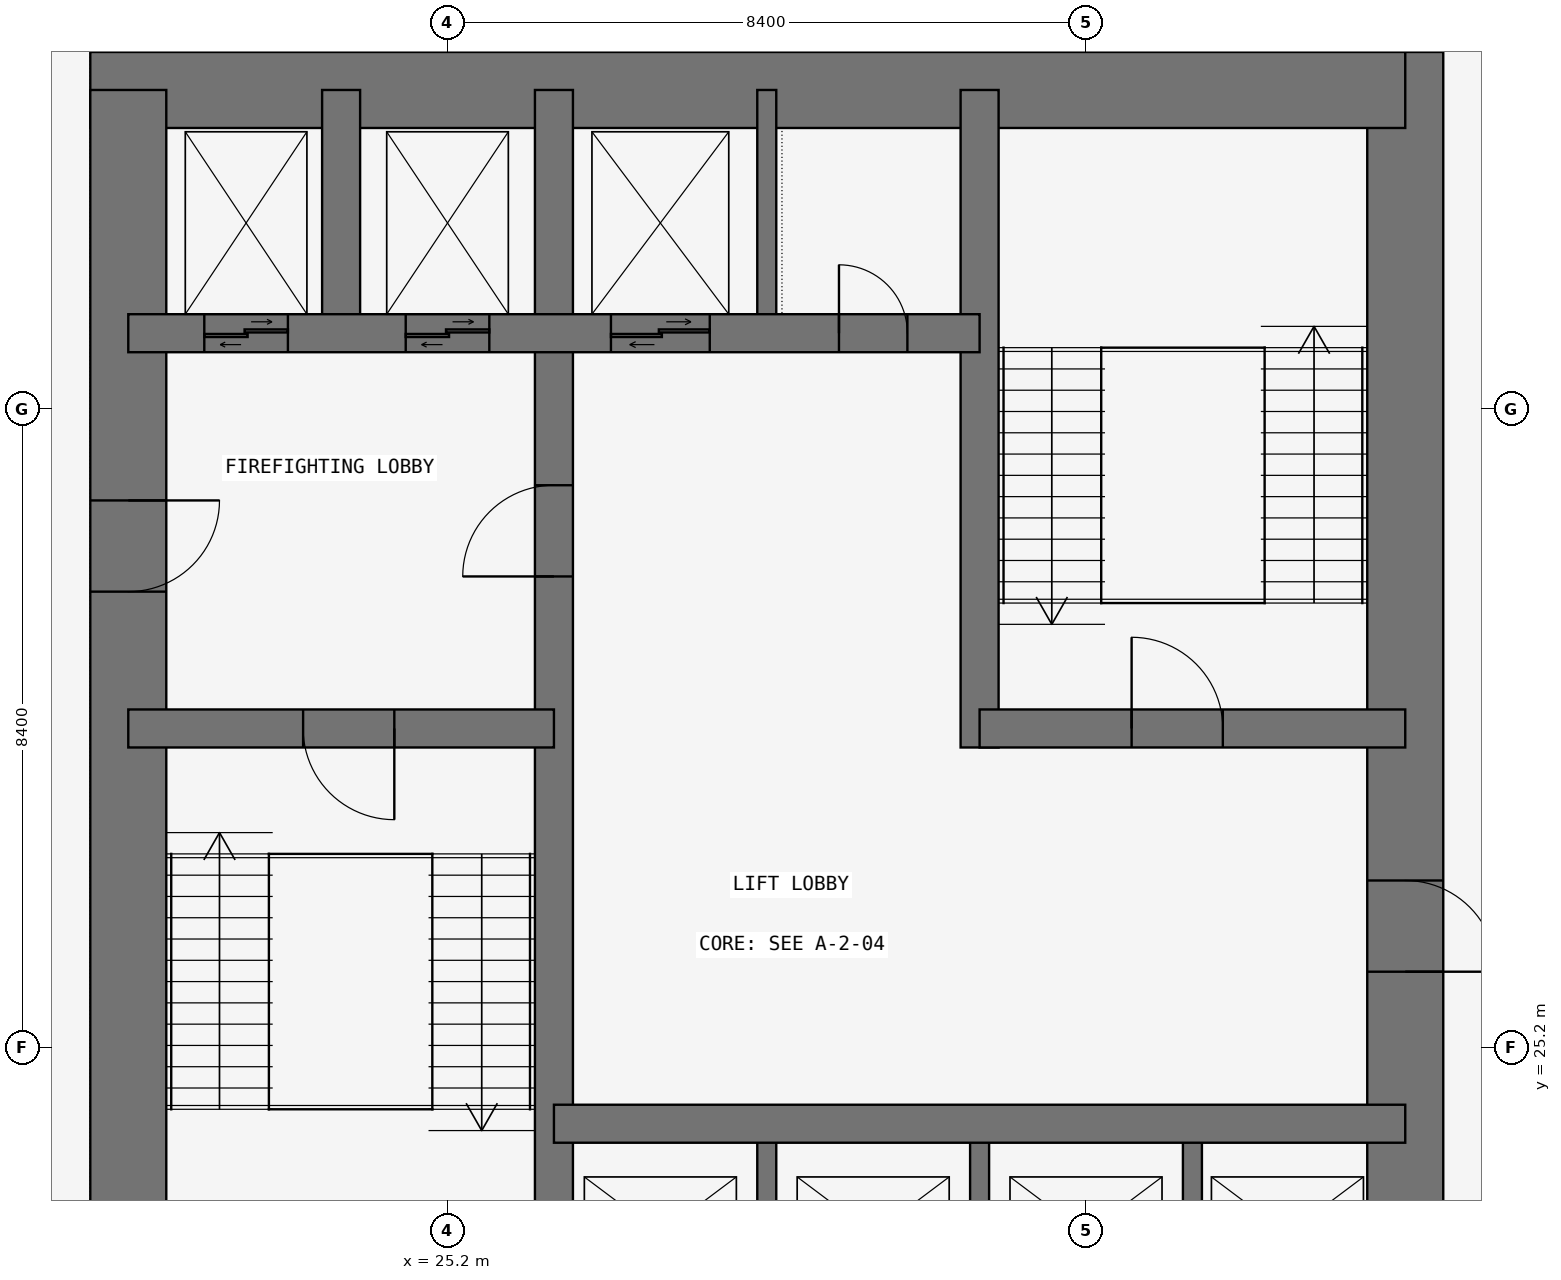
"""IFC4 building model, lengths in metres.
Left out: names, types, materials, properties, quantities, classifications, styles, units other than length and angle.
Written with IfcOpenShell. Run it as: python <this file> out.ifc"""

import sys

from ifc_helpers import new_model, si_unit, direction, frame, frame_2d, origin, place, context, subcontext, project, spatial, rectangle, extrude, element, fill, save


model = new_model("IFC4")
c1 = context("Model", 3, precision=1e-05, world=origin(), true_north=direction((0.0, 1.0)))
c2 = subcontext(c1, "Body", "Model", "MODEL_VIEW")
j1 = project(units=[si_unit("LENGTHUNIT", "METRE"), si_unit("PLANEANGLEUNIT", "RADIAN")], contexts=[c1])
p1 = place(None, origin())
s1 = spatial("IfcSite", under=j1, at=p1, CompositionType="ELEMENT")
p2 = place(p1, origin())
s2 = spatial("IfcBuilding", under=s1, at=p2, CompositionType="ELEMENT")
p3 = place(p2, frame((0.0, 0.0, 6.0)))
s3 = spatial("IfcBuildingStorey", under=s2, at=p3, CompositionType="ELEMENT", Elevation=6.0)
p4 = place(p3, frame((37.8, 21.0, 0.0), z_axis=(0.0, 0.0, 1.0), x_axis=(0.0, 1.0, 0.0)))
e1 = element("IfcWall", 1, at=p4, inside=s3, PredefinedType="SHEAR", context=c2, shape_type="SweptSolid", body=[
    extrude(rectangle(XDim=17.3, YDim=1.0, at=frame_2d((8.65, 0.0))), origin(), (0.0, 0.0, 1.0), 4.5),
])
p5 = place(p4, frame((5.2, 0.0, 0.0)))
e2 = element("IfcOpeningElement", 2, at=p5, cuts=e1, PredefinedType="OPENING", context=c2, shape_type="SweptSolid", body=[
    extrude(rectangle(XDim=1.2, YDim=2.1, at=frame_2d((0.6, 1.05))), frame((0.0, 0.51, 0.0), z_axis=(0.0, -1.0, 0.0), x_axis=(1.0, 0.0, 0.0)), (0.0, 0.0, 1.0), 1.02),
])
p6 = place(p3, frame((37.8, 37.8, 0.0), z_axis=(0.0, 0.0, 1.0), x_axis=(-1.0, 0.0, 0.0)))
e3 = element("IfcWall", 3, at=p6, inside=s3, PredefinedType="SHEAR", context=c2, shape_type="SweptSolid", body=[
    extrude(rectangle(XDim=17.3, YDim=1.0, at=frame_2d((8.65, 0.0))), origin(), (0.0, 0.0, 1.0), 4.5),
])
p7 = place(p3, frame((21.0, 37.8, 0.0), z_axis=(0.0, 0.0, 1.0), x_axis=(0.0, -1.0, 0.0)))
e4 = element("IfcWall", 4, at=p7, inside=s3, PredefinedType="SHEAR", context=c2, shape_type="SweptSolid", body=[
    extrude(rectangle(XDim=17.3, YDim=1.0, at=frame_2d((8.65, 0.0))), origin(), (0.0, 0.0, 1.0), 4.5),
])
p8 = place(p7, frame((5.4, 0.0, 0.0)))
e5 = element("IfcOpeningElement", 5, at=p8, cuts=e4, PredefinedType="OPENING", context=c2, shape_type="SweptSolid", body=[
    extrude(rectangle(XDim=1.2, YDim=2.1, at=frame_2d((0.6, 1.05))), frame((0.0, 0.51, 0.0), z_axis=(0.0, -1.0, 0.0), x_axis=(1.0, 0.0, 0.0)), (0.0, 0.0, 1.0), 1.02),
])
p9 = place(p3, frame((26.6, 21.0, 0.0), z_axis=(0.0, 0.0, 1.0), x_axis=(0.0, 1.0, 0.0)))
e6 = element("IfcWall", 6, at=p9, inside=s3, PredefinedType="SHEAR", context=c2, shape_type="SweptSolid", body=[
    extrude(rectangle(XDim=16.8, YDim=0.5, at=frame_2d((8.4, 0.0))), origin(), (0.0, 0.0, 1.0), 4.5),
])
p10 = place(p9, frame((10.4, 0.0, 0.0)))
e7 = element("IfcOpeningElement", 7, at=p10, cuts=e6, PredefinedType="OPENING", context=c2, shape_type="SweptSolid", body=[
    extrude(rectangle(XDim=1.2, YDim=2.1, at=frame_2d((0.6, 1.05))), frame((0.0, 0.26, 0.0), z_axis=(0.0, -1.0, 0.0), x_axis=(1.0, 0.0, 0.0)), (0.0, 0.0, 1.0), 0.52),
])
p11 = place(p3, frame((21.0, 29.4, 0.0), z_axis=(0.0, 0.0, 1.0), x_axis=(1.0, 0.0, 0.0)))
e8 = element("IfcWall", 8, at=p11, inside=s3, PredefinedType="SHEAR", context=c2, shape_type="SweptSolid", body=[
    extrude(rectangle(XDim=5.6, YDim=0.5, at=frame_2d((2.8, 0.0))), origin(), (0.0, 0.0, 1.0), 4.5),
])
p12 = place(p11, frame((2.3, 0.0, 0.0)))
e9 = element("IfcOpeningElement", 9, at=p12, cuts=e8, PredefinedType="OPENING", context=c2, shape_type="SweptSolid", body=[
    extrude(rectangle(XDim=1.2, YDim=2.1, at=frame_2d((0.6, 1.05))), frame((0.0, 0.26, 0.0), z_axis=(0.0, -1.0, 0.0), x_axis=(1.0, 0.0, 0.0)), (0.0, 0.0, 1.0), 0.52),
])
p13 = place(p3, frame((21.0, 34.6, 0.0), z_axis=(0.0, 0.0, 1.0), x_axis=(1.0, 0.0, 0.0)))
e10 = element("IfcWall", 10, at=p13, inside=s3, PredefinedType="SHEAR", context=c2, shape_type="SweptSolid", body=[
    extrude(rectangle(XDim=11.2, YDim=0.5, at=frame_2d((5.6, 0.0))), origin(), (0.0, 0.0, 1.0), 4.5),
])
p14 = place(p13, frame((9.35, 0.0, 0.0)))
e11 = element("IfcOpeningElement", 11, at=p14, cuts=e10, PredefinedType="OPENING", context=c2, shape_type="SweptSolid", body=[
    extrude(rectangle(XDim=0.9, YDim=2.1, at=frame_2d((0.45, 1.05))), frame((0.0, 0.26, 0.0), z_axis=(0.0, -1.0, 0.0), x_axis=(1.0, 0.0, 0.0)), (0.0, 0.0, 1.0), 0.52),
])
p15 = place(p13, frame((1.0, 0.0, 0.0)))
e12 = element("IfcOpeningElement", 12, at=p15, cuts=e10, PredefinedType="OPENING", context=c2, shape_type="SweptSolid", body=[
    extrude(rectangle(XDim=1.1, YDim=2.1, at=frame_2d((0.55, 1.05))), frame((0.0, 0.26, 0.0), z_axis=(0.0, -1.0, 0.0), x_axis=(1.0, 0.0, 0.0)), (0.0, 0.0, 1.0), 0.52),
])
p16 = place(p13, frame((3.65, 0.0, 0.0)))
e13 = element("IfcOpeningElement", 13, at=p16, cuts=e10, PredefinedType="OPENING", context=c2, shape_type="SweptSolid", body=[
    extrude(rectangle(XDim=1.1, YDim=2.1, at=frame_2d((0.55, 1.05))), frame((0.0, 0.26, 0.0), z_axis=(0.0, -1.0, 0.0), x_axis=(1.0, 0.0, 0.0)), (0.0, 0.0, 1.0), 0.52),
])
p17 = place(p13, frame((6.35, 0.0, 0.0)))
e14 = element("IfcOpeningElement", 14, at=p17, cuts=e10, PredefinedType="OPENING", context=c2, shape_type="SweptSolid", body=[
    extrude(rectangle(XDim=1.3, YDim=2.1, at=frame_2d((0.65, 1.05))), frame((0.0, 0.26, 0.0), z_axis=(0.0, -1.0, 0.0), x_axis=(1.0, 0.0, 0.0)), (0.0, 0.0, 1.0), 0.52),
])
p18 = place(p3, frame((23.8, 34.6, 0.0), z_axis=(0.0, 0.0, 1.0), x_axis=(0.0, 1.0, 0.0)))
e15 = element("IfcWall", 15, at=p18, inside=s3, PredefinedType="SHEAR", context=c2, shape_type="SweptSolid", body=[
    extrude(rectangle(XDim=3.2, YDim=0.5, at=frame_2d((1.6, 0.0))), origin(), (0.0, 0.0, 1.0), 4.5),
])
p19 = place(p3, frame((26.6, 24.2, 0.0), z_axis=(0.0, 0.0, 1.0), x_axis=(1.0, 0.0, 0.0)))
e16 = element("IfcWall", 16, at=p19, inside=s3, PredefinedType="SHEAR", context=c2, shape_type="SweptSolid", body=[
    extrude(rectangle(XDim=11.2, YDim=0.5, at=frame_2d((5.6, 0.0))), origin(), (0.0, 0.0, 1.0), 4.5),
])
p20 = place(p3, frame((32.2, 29.15, 0.0), z_axis=(0.0, 0.0, 1.0), x_axis=(0.0, 1.0, 0.0)))
e17 = element("IfcWall", 17, at=p20, inside=s3, PredefinedType="SHEAR", context=c2, shape_type="SweptSolid", body=[
    extrude(rectangle(XDim=8.65, YDim=0.5, at=frame_2d((4.325, 0.0))), origin(), (0.0, 0.0, 1.0), 4.5),
])
p21 = place(p3, frame((32.2, 29.4, 0.0), z_axis=(0.0, 0.0, 1.0), x_axis=(1.0, 0.0, 0.0)))
e18 = element("IfcWall", 18, at=p21, inside=s3, PredefinedType="SHEAR", context=c2, shape_type="SweptSolid", body=[
    extrude(rectangle(XDim=5.6, YDim=0.5, at=frame_2d((2.8, 0.0))), origin(), (0.0, 0.0, 1.0), 4.5),
])
p22 = place(p21, frame((2.0, 0.0, 0.0)))
e19 = element("IfcOpeningElement", 19, at=p22, cuts=e18, PredefinedType="OPENING", context=c2, shape_type="SweptSolid", body=[
    extrude(rectangle(XDim=1.2, YDim=2.1, at=frame_2d((0.6, 1.05))), frame((0.0, 0.26, 0.0), z_axis=(0.0, -1.0, 0.0), x_axis=(1.0, 0.0, 0.0)), (0.0, 0.0, 1.0), 0.52),
])
for number, where, z_axis, x_axis in (
    (20, (29.4, 21.0, 0.0), (0.0, 0.0, 1.0), (0.0, 1.0, 0.0)),
    (21, (32.2, 21.0, 0.0), (0.0, 0.0, 1.0), (0.0, 1.0, 0.0)),
    (22, (35.0, 21.0, 0.0), (0.0, 0.0, 1.0), (0.0, 1.0, 0.0)),
    (23, (29.4, 34.6, 0.0), (0.0, 0.0, 1.0), (0.0, 1.0, 0.0)),
):
    element("IfcWall", number, at=place(p3, frame(where, z_axis=z_axis, x_axis=x_axis)), inside=s3, PredefinedType="SHEAR", context=c2, shape_type="SweptSolid", body=[
        extrude(rectangle(XDim=3.2, YDim=0.25, at=frame_2d((1.6, 0.0))), origin(), (0.0, 0.0, 1.0), 4.5),
    ])
p23 = place(p8, origin())
e24 = element("IfcDoor", 24, at=p23, inside=s3, OperationType="SINGLE_SWING_LEFT", PredefinedType="DOOR", context=c2, shape_type="SweptSolid", body=[
    extrude(rectangle(XDim=1.2, YDim=2.1, at=frame_2d((0.6, 1.05))), frame((0.0, 0.025, 0.0), z_axis=(0.0, -1.0, 0.0), x_axis=(1.0, 0.0, 0.0)), (0.0, 0.0, 1.0), 0.05),
])
fill(e5, e24)
p24 = place(p12, frame((1.2, 0.0, 0.0), z_axis=(0.0, 0.0, 1.0), x_axis=(-1.0, 0.0, 0.0)))
e25 = element("IfcDoor", 25, at=p24, inside=s3, OperationType="SINGLE_SWING_LEFT", PredefinedType="DOOR", context=c2, shape_type="SweptSolid", body=[
    extrude(rectangle(XDim=1.2, YDim=2.1, at=frame_2d((0.6, 1.05))), frame((0.0, 0.025, 0.0), z_axis=(0.0, -1.0, 0.0), x_axis=(1.0, 0.0, 0.0)), (0.0, 0.0, 1.0), 0.05),
])
fill(e9, e25)
p25 = place(p10, origin())
e26 = element("IfcDoor", 26, at=p25, inside=s3, OperationType="SINGLE_SWING_LEFT", PredefinedType="DOOR", context=c2, shape_type="SweptSolid", body=[
    extrude(rectangle(XDim=1.2, YDim=2.1, at=frame_2d((0.6, 1.05))), frame((0.0, 0.025, 0.0), z_axis=(0.0, -1.0, 0.0), x_axis=(1.0, 0.0, 0.0)), (0.0, 0.0, 1.0), 0.05),
])
fill(e7, e26)
p26 = place(p5, frame((1.2, 0.0, 0.0), z_axis=(0.0, 0.0, 1.0), x_axis=(-1.0, 0.0, 0.0)))
e27 = element("IfcDoor", 27, at=p26, inside=s3, OperationType="SINGLE_SWING_RIGHT", PredefinedType="DOOR", context=c2, shape_type="SweptSolid", body=[
    extrude(rectangle(XDim=1.2, YDim=2.1, at=frame_2d((0.6, 1.05))), frame((0.0, 0.025, 0.0), z_axis=(0.0, -1.0, 0.0), x_axis=(1.0, 0.0, 0.0)), (0.0, 0.0, 1.0), 0.05),
])
fill(e2, e27)
p27 = place(p22, origin())
e28 = element("IfcDoor", 28, at=p27, inside=s3, OperationType="SINGLE_SWING_LEFT", PredefinedType="DOOR", context=c2, shape_type="SweptSolid", body=[
    extrude(rectangle(XDim=1.2, YDim=2.1, at=frame_2d((0.6, 1.05))), frame((0.0, 0.025, 0.0), z_axis=(0.0, -1.0, 0.0), x_axis=(1.0, 0.0, 0.0)), (0.0, 0.0, 1.0), 0.05),
])
fill(e19, e28)
p28 = place(p14, origin())
e29 = element("IfcDoor", 29, at=p28, inside=s3, OperationType="SINGLE_SWING_LEFT", PredefinedType="DOOR", context=c2, shape_type="SweptSolid", body=[
    extrude(rectangle(XDim=0.9, YDim=2.1, at=frame_2d((0.45, 1.05))), frame((0.0, 0.025, 0.0), z_axis=(0.0, -1.0, 0.0), x_axis=(1.0, 0.0, 0.0)), (0.0, 0.0, 1.0), 0.05),
])
fill(e11, e29)
p29 = place(p15, origin())
e30 = element("IfcDoor", 30, at=p29, inside=s3, OperationType="DOUBLE_DOOR_SLIDING", PredefinedType="DOOR", context=c2, shape_type="SweptSolid", body=[
    extrude(rectangle(XDim=1.1, YDim=2.1, at=frame_2d((0.55, 1.05))), frame((0.0, 0.025, 0.0), z_axis=(0.0, -1.0, 0.0), x_axis=(1.0, 0.0, 0.0)), (0.0, 0.0, 1.0), 0.05),
])
fill(e12, e30)
p30 = place(p16, origin())
e31 = element("IfcDoor", 31, at=p30, inside=s3, OperationType="DOUBLE_DOOR_SLIDING", PredefinedType="DOOR", context=c2, shape_type="SweptSolid", body=[
    extrude(rectangle(XDim=1.1, YDim=2.1, at=frame_2d((0.55, 1.05))), frame((0.0, 0.025, 0.0), z_axis=(0.0, -1.0, 0.0), x_axis=(1.0, 0.0, 0.0)), (0.0, 0.0, 1.0), 0.05),
])
fill(e13, e31)
p31 = place(p17, origin())
e32 = element("IfcDoor", 32, at=p31, inside=s3, OperationType="DOUBLE_DOOR_SLIDING", PredefinedType="DOOR", context=c2, shape_type="SweptSolid", body=[
    extrude(rectangle(XDim=1.3, YDim=2.1, at=frame_2d((0.65, 1.05))), frame((0.0, 0.025, 0.0), z_axis=(0.0, -1.0, 0.0), x_axis=(1.0, 0.0, 0.0)), (0.0, 0.0, 1.0), 0.05),
])
fill(e14, e32)
save(model, sys.argv[1])
